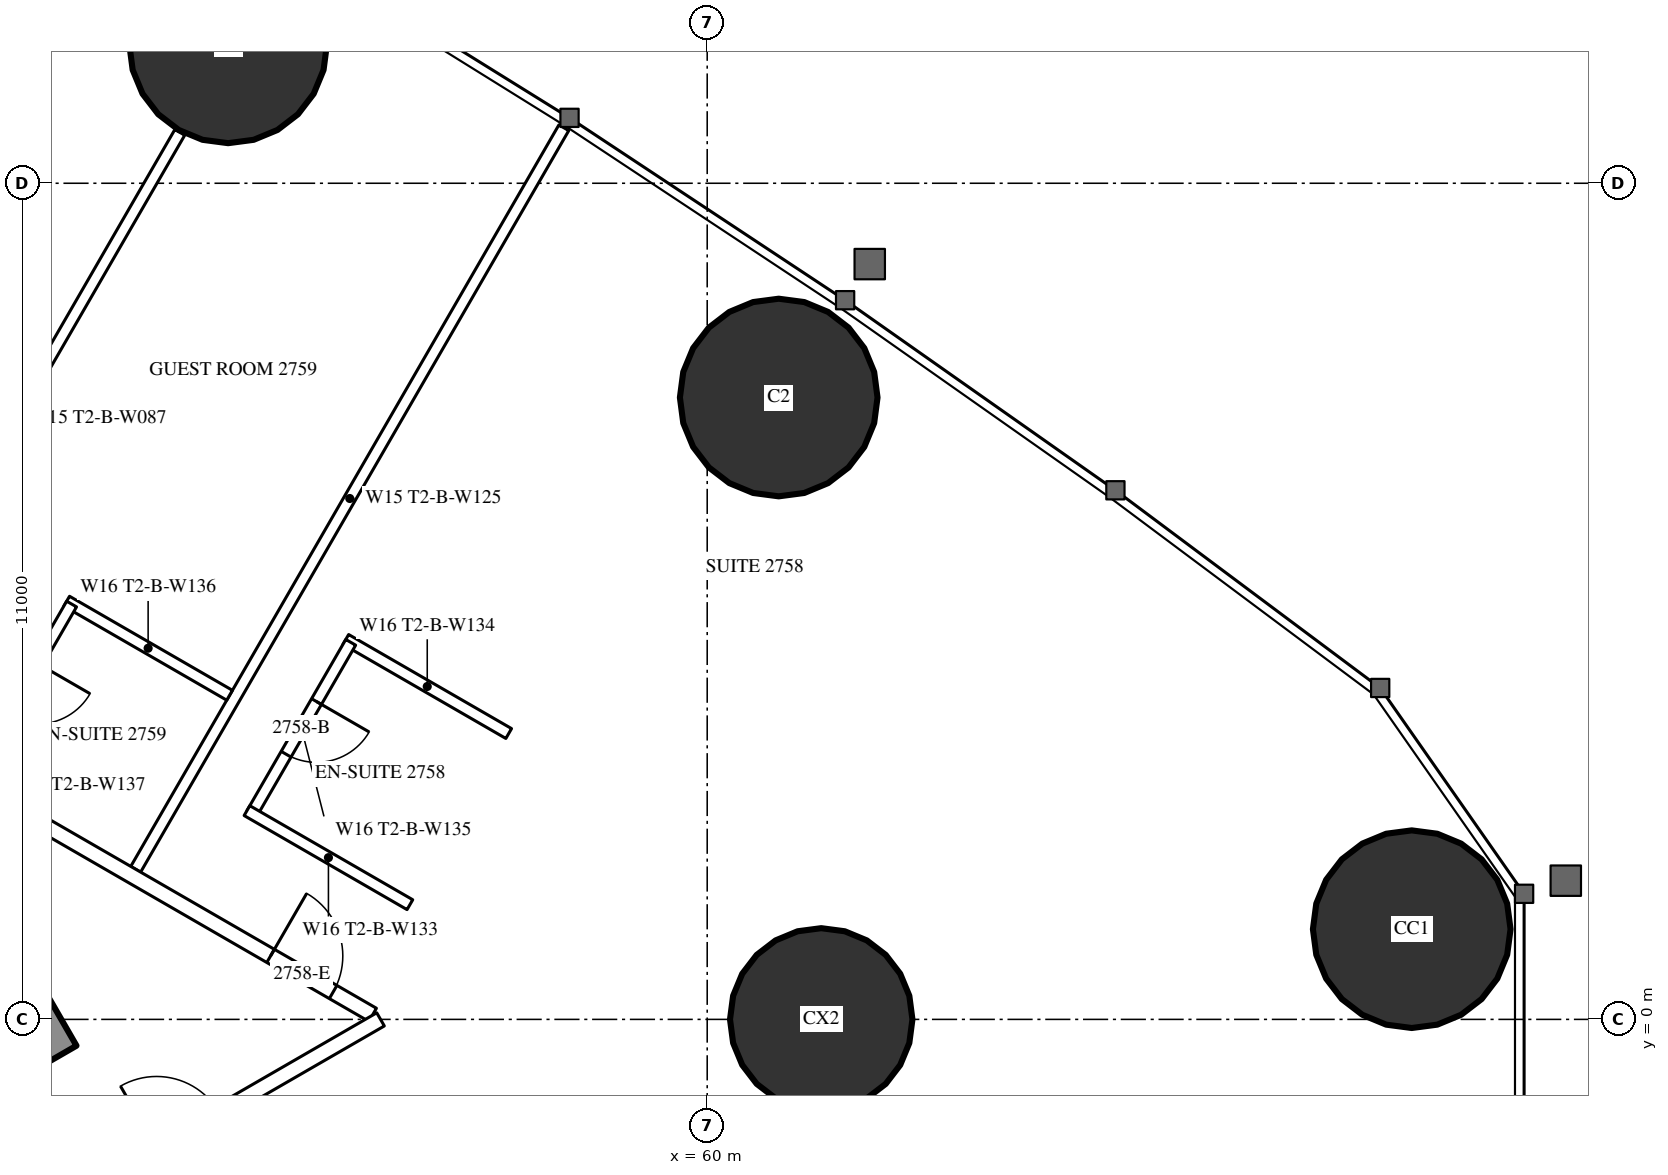
"""IFC4 building model, lengths in metres.
Left out: names, types, materials, properties, quantities, classifications, styles, units other than length and angle.
Written with IfcOpenShell. Run it as: python <this file> out.ifc"""

import sys

from ifc_helpers import new_model, si_unit, direction, frame, frame_2d, origin, origin_2d, place, context, subcontext, project, spatial, rectangle, circle, hollow_circle, extrude, element, fill, save


model = new_model("IFC4")
c1 = context("Model", 3, precision=1e-05, world=origin(), true_north=direction((0.0, 1.0)))
c2 = subcontext(c1, "Body", "Model", "MODEL_VIEW")
j1 = project(units=[si_unit("LENGTHUNIT", "METRE"), si_unit("PLANEANGLEUNIT", "RADIAN")], contexts=[c1])
p1 = place(None, origin())
s1 = spatial("IfcSite", under=j1, at=p1, CompositionType="ELEMENT")
p2 = place(p1, origin())
s2 = spatial("IfcBuilding", under=s1, at=p2, CompositionType="ELEMENT")
p3 = place(p2, frame((0.0, 0.0, 104.6)))
s3 = spatial("IfcBuildingStorey", under=s2, at=p3, CompositionType="ELEMENT", Elevation=104.6)
for number, where, z_axis, x_axis in (
    (1, (69.269, 1.187, 0.0), (0.0, 0.0, 1.0), (1.0, 0.0, 0.0)),
    (2, (60.941, 8.181, 0.0), (0.0, 0.0, 1.0), (1.0, 0.0, 0.0)),
    (3, (53.697, 12.827, 0.0), (0.0, 0.0, 1.0), (1.0, 0.0, 0.0)),
):
    element("IfcColumn", number, at=place(p3, frame(where, z_axis=z_axis, x_axis=x_axis)), inside=s3, PredefinedType="COLUMN", context=c2, shape_type="SweptSolid", body=[
        extrude(hollow_circle(Radius=1.3, WallThickness=0.1, at=origin_2d()), origin(), (0.0, 0.0, 1.0), 3.5),
    ])
p4 = place(p3, frame((61.5, 0.0, 0.0), z_axis=(0.0, 0.0, 1.0), x_axis=(1.0, 0.0, 0.0)))
e4 = element("IfcColumn", 4, at=p4, inside=s3, PredefinedType="COLUMN", context=c2, shape_type="SweptSolid", body=[
    extrude(circle(Radius=1.2, at=origin_2d()), origin(), (0.0, 0.0, 1.0), 3.5),
])
p5 = place(p3, frame((27.2, -13.8, 0.0), z_axis=(0.0, 0.0, 1.0), x_axis=(0.866027159892, 0.499996958321, 0.0)))
e5 = element("IfcWall", 5, at=p5, inside=s3, PredefinedType="SHEAR", context=c2, shape_type="SweptSolid", body=[
    extrude(rectangle(XDim=27.947, YDim=1.2, at=frame_2d((13.973, 0.0))), origin(), (0.0, 0.0, 1.0), 3.5),
])
p6 = place(p5, frame((4.6, 0.0, 0.0)))
e6 = element("IfcOpeningElement", 6, at=p6, cuts=e5, PredefinedType="OPENING", context=c2, shape_type="SweptSolid", body=[
    extrude(rectangle(XDim=1.0, YDim=2.2, at=frame_2d((0.5, 1.1))), frame((0.0, 0.61, 0.0), z_axis=(0.0, -1.0, 0.0), x_axis=(1.0, 0.0, 0.0)), (0.0, 0.0, 1.0), 1.22),
])
p7 = place(p5, frame((13.395, 0.0, 0.0)))
e7 = element("IfcOpeningElement", 7, at=p7, cuts=e5, PredefinedType="OPENING", context=c2, shape_type="SweptSolid", body=[
    extrude(rectangle(XDim=1.8, YDim=2.2, at=frame_2d((0.9, 1.1))), frame((0.0, 0.61, 0.0), z_axis=(0.0, -1.0, 0.0), x_axis=(1.0, 0.0, 0.0)), (0.0, 0.0, 1.0), 1.22),
])
p8 = place(p3, frame((48.719, 4.147, 0.0), z_axis=(0.0, 0.0, 1.0), x_axis=(0.499993328235, 0.866029255696, 0.0)))
e8 = element("IfcWall", 8, at=p8, inside=s3, PredefinedType="PARTITIONING", context=c2, shape_type="SweptSolid", body=[
    extrude(rectangle(XDim=8.686, YDim=0.15, at=frame_2d((4.343, 0.0))), origin(), (0.0, 0.0, 1.0), 2.2),
])
p9 = place(p3, frame((52.481, 1.975, 0.0), z_axis=(0.0, 0.0, 1.0), x_axis=(0.500003867771, 0.866023170714, 0.0)))
e9 = element("IfcWall", 9, at=p9, inside=s3, PredefinedType="PARTITIONING", context=c2, shape_type="SweptSolid", body=[
    extrude(rectangle(XDim=11.265, YDim=0.15, at=frame_2d((5.632, 0.0))), origin(), (0.0, 0.0, 1.0), 3.25),
])
p10 = place(p3, frame((36.834, 10.894, 0.0), z_axis=(0.0, 0.0, 1.0), x_axis=(0.866028157229, -0.499995230863, 0.0)))
e10 = element("IfcWall", 10, at=p10, inside=s3, PredefinedType="PARTITIONING", context=c2, shape_type="SweptSolid", body=[
    extrude(rectangle(XDim=21.667, YDim=0.2, at=frame_2d((10.833, 0.0))), origin(), (0.0, 0.0, 1.0), 3.25),
])
p11 = place(p10, frame((20.117, 0.0, 0.0)))
e11 = element("IfcOpeningElement", 11, at=p11, cuts=e10, PredefinedType="OPENING", context=c2, shape_type="SweptSolid", body=[
    extrude(rectangle(XDim=0.95, YDim=2.2, at=frame_2d((0.475, 1.1))), frame((0.0, 0.11, 0.0), z_axis=(0.0, -1.0, 0.0), x_axis=(1.0, 0.0, 0.0)), (0.0, 0.0, 1.0), 0.22),
])
p12 = place(p10, frame((14.335, 0.0, 0.0)))
e12 = element("IfcOpeningElement", 12, at=p12, cuts=e10, PredefinedType="OPENING", context=c2, shape_type="SweptSolid", body=[
    extrude(rectangle(XDim=0.95, YDim=2.2, at=frame_2d((0.475, 1.1))), frame((0.0, 0.11, 0.0), z_axis=(0.0, -1.0, 0.0), x_axis=(1.0, 0.0, 0.0)), (0.0, 0.0, 1.0), 0.22),
])
p13 = place(p10, frame((9.693, 0.0, 0.0)))
e13 = element("IfcOpeningElement", 13, at=p13, cuts=e10, PredefinedType="OPENING", context=c2, shape_type="SweptSolid", body=[
    extrude(rectangle(XDim=0.95, YDim=2.2, at=frame_2d((0.475, 1.1))), frame((0.0, 0.11, 0.0), z_axis=(0.0, -1.0, 0.0), x_axis=(1.0, 0.0, 0.0)), (0.0, 0.0, 1.0), 0.22),
])
p14 = place(p10, frame((2.95, 0.0, 0.0)))
e14 = element("IfcOpeningElement", 14, at=p14, cuts=e10, PredefinedType="OPENING", context=c2, shape_type="SweptSolid", body=[
    extrude(rectangle(XDim=0.95, YDim=2.2, at=frame_2d((0.475, 1.1))), frame((0.0, 0.11, 0.0), z_axis=(0.0, -1.0, 0.0), x_axis=(1.0, 0.0, 0.0)), (0.0, 0.0, 1.0), 0.22),
])
p15 = place(p3, frame((48.69, -4.048, 0.0), z_axis=(0.0, 0.0, 1.0), x_axis=(0.866026410209, 0.499998256818, 0.0)))
e15 = element("IfcWall", 15, at=p15, inside=s3, PredefinedType="PARTITIONING", context=c2, shape_type="SweptSolid", body=[
    extrude(rectangle(XDim=8.097, YDim=0.2, at=frame_2d((4.048, 0.0))), origin(), (0.0, 0.0, 1.0), 3.25),
])
p16 = place(p15, frame((0.6, 0.0, 0.0)))
e16 = element("IfcOpeningElement", 16, at=p16, cuts=e15, PredefinedType="OPENING", context=c2, shape_type="SweptSolid", body=[
    extrude(rectangle(XDim=0.95, YDim=2.2, at=frame_2d((0.475, 1.1))), frame((0.0, 0.11, 0.0), z_axis=(0.0, -1.0, 0.0), x_axis=(1.0, 0.0, 0.0)), (0.0, 0.0, 1.0), 0.22),
])
p17 = place(p15, frame((4.695, 0.0, 0.0)))
e17 = element("IfcOpeningElement", 17, at=p17, cuts=e15, PredefinedType="OPENING", context=c2, shape_type="SweptSolid", body=[
    extrude(rectangle(XDim=0.95, YDim=2.2, at=frame_2d((0.475, 1.1))), frame((0.0, 0.11, 0.0), z_axis=(0.0, -1.0, 0.0), x_axis=(1.0, 0.0, 0.0)), (0.0, 0.0, 1.0), 0.22),
])
p18 = place(p3, frame((55.245, 4.998, 0.0), z_axis=(0.0, 0.0, 1.0), x_axis=(0.866006523861, -0.500032699561, 0.0)))
e18 = element("IfcWall", 18, at=p18, inside=s3, PredefinedType="PARTITIONING", context=c2, shape_type="SweptSolid", body=[
    extrude(rectangle(XDim=2.475, YDim=0.15, at=frame_2d((1.237, 0.0))), origin(), (0.0, 0.0, 1.0), 3.25),
])
p19 = place(p3, frame((54.01, 2.709, 0.0), z_axis=(0.0, 0.0, 1.0), x_axis=(0.500006934395, 0.866021400173, 0.0)))
e19 = element("IfcWall", 19, at=p19, inside=s3, PredefinedType="PARTITIONING", context=c2, shape_type="SweptSolid", body=[
    extrude(rectangle(XDim=2.6, YDim=0.15, at=frame_2d((1.3, 0.0))), origin(), (0.0, 0.0, 1.0), 3.25),
])
p20 = place(p19, frame((0.9, 0.0, 0.0)))
e20 = element("IfcOpeningElement", 20, at=p20, cuts=e19, PredefinedType="OPENING", context=c2, shape_type="SweptSolid", body=[
    extrude(rectangle(XDim=0.8, YDim=2.2, at=frame_2d((0.4, 1.1))), frame((0.0, 0.085, 0.0), z_axis=(0.0, -1.0, 0.0), x_axis=(1.0, 0.0, 0.0)), (0.0, 0.0, 1.0), 0.17),
])
p21 = place(p3, frame((53.945, 2.747, 0.0), z_axis=(0.0, 0.0, 1.0), x_axis=(0.866031185235, -0.4999899861, 0.0)))
e21 = element("IfcWall", 21, at=p21, inside=s3, PredefinedType="PARTITIONING", context=c2, shape_type="SweptSolid", body=[
    extrude(rectangle(XDim=2.475, YDim=0.15, at=frame_2d((1.238, 0.0))), origin(), (0.0, 0.0, 1.0), 3.25),
])
p22 = place(p3, frame((51.573, 5.502, 0.0), z_axis=(0.0, 0.0, 1.0), x_axis=(0.866006523861, -0.500032699561, 0.0)))
e22 = element("IfcWall", 22, at=p22, inside=s3, PredefinedType="PARTITIONING", context=c2, shape_type="SweptSolid", body=[
    extrude(rectangle(XDim=2.475, YDim=0.15, at=frame_2d((1.237, 0.0))), origin(), (0.0, 0.0, 1.0), 3.25),
])
p23 = place(p3, frame((50.338, 3.213, 0.0), z_axis=(0.0, 0.0, 1.0), x_axis=(0.500047596559, 0.865997922154, 0.0)))
e23 = element("IfcWall", 23, at=p23, inside=s3, PredefinedType="PARTITIONING", context=c2, shape_type="SweptSolid", body=[
    extrude(rectangle(XDim=2.6, YDim=0.15, at=frame_2d((1.3, 0.0))), origin(), (0.0, 0.0, 1.0), 3.25),
])
p24 = place(p23, frame((0.9, 0.0, 0.0)))
e24 = element("IfcOpeningElement", 24, at=p24, cuts=e23, PredefinedType="OPENING", context=c2, shape_type="SweptSolid", body=[
    extrude(rectangle(XDim=0.8, YDim=2.2, at=frame_2d((0.4, 1.1))), frame((0.0, 0.085, 0.0), z_axis=(0.0, -1.0, 0.0), x_axis=(1.0, 0.0, 0.0)), (0.0, 0.0, 1.0), 0.17),
])
p25 = place(p20, origin())
e25 = element("IfcDoor", 25, at=p25, inside=s3, OperationType="SINGLE_SWING_RIGHT", PredefinedType="DOOR", context=c2, shape_type="SweptSolid", body=[
    extrude(rectangle(XDim=0.8, YDim=2.2, at=frame_2d((0.4, 1.1))), frame((0.0, 0.025, 0.0), z_axis=(0.0, -1.0, 0.0), x_axis=(1.0, 0.0, 0.0)), (0.0, 0.0, 1.0), 0.05),
])
fill(e20, e25)
p26 = place(p11, origin())
e26 = element("IfcDoor", 26, at=p26, inside=s3, OperationType="SINGLE_SWING_LEFT", PredefinedType="DOOR", context=c2, shape_type="SweptSolid", body=[
    extrude(rectangle(XDim=0.95, YDim=2.2, at=frame_2d((0.475, 1.1))), frame((0.0, 0.025, 0.0), z_axis=(0.0, -1.0, 0.0), x_axis=(1.0, 0.0, 0.0)), (0.0, 0.0, 1.0), 0.05),
])
fill(e11, e26)
save(model, sys.argv[1])
